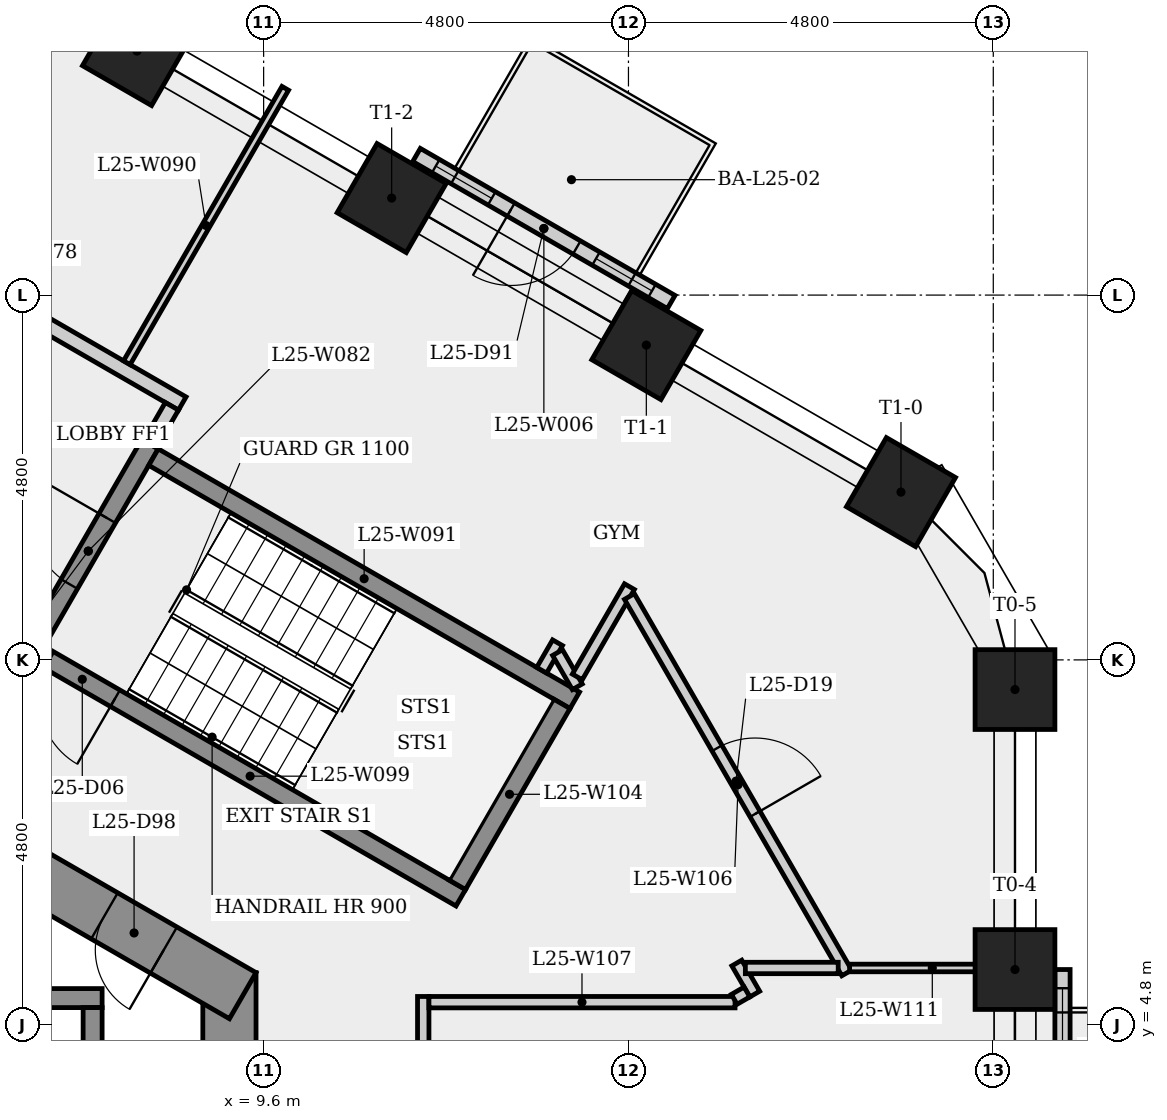
"""IFC4 building model, lengths in metres.
Left out: names, types, materials, properties, quantities, classifications, styles, units other than length and angle.
Written with IfcOpenShell. Run it as: python <this file> out.ifc"""

import sys

from ifc_helpers import new_model, si_unit, direction, frame, frame_2d, origin, origin_2d, place, context, subcontext, project, spatial, rectangle, extrude, element, fill, save


model = new_model("IFC4")
c1 = context("Model", 3, precision=1e-05, world=origin(), true_north=direction((0.0, 1.0)))
c2 = subcontext(c1, "Body", "Model", "MODEL_VIEW")
j1 = project(units=[si_unit("LENGTHUNIT", "METRE"), si_unit("PLANEANGLEUNIT", "RADIAN")], contexts=[c1])
p1 = place(None, origin())
s1 = spatial("IfcSite", under=j1, at=p1, CompositionType="ELEMENT")
p2 = place(p1, origin())
s2 = spatial("IfcBuilding", under=s1, at=p2, CompositionType="ELEMENT")
p3 = place(p2, frame((0.0, 0.0, 96.7)))
s3 = spatial("IfcBuildingStorey", under=s2, at=p3, CompositionType="ELEMENT", Elevation=96.7)
p4 = place(p3, frame((9.15, -5.485, 0.0), z_axis=(0.0, 0.0, 1.0), x_axis=(0.0, 1.0, 0.0)))
e1 = element("IfcWall", 1, at=p4, inside=s3, PredefinedType="SHEAR", context=c2, shape_type="SweptSolid", body=[
    extrude(rectangle(XDim=10.97, YDim=0.7, at=frame_2d((5.485, 0.0))), origin(), (0.0, 0.0, 1.0), 3.4),
])
p5 = place(p4, frame((4.685, 0.0, 0.0)))
e2 = element("IfcOpeningElement", 2, at=p5, cuts=e1, PredefinedType="OPENING", context=c2, shape_type="SweptSolid", body=[
    extrude(rectangle(XDim=1.6, YDim=2.1, at=frame_2d((0.8, 1.05))), frame((0.0, 0.36, 0.0), z_axis=(0.0, -1.0, 0.0), x_axis=(1.0, 0.0, 0.0)), (0.0, 0.0, 1.0), 0.72),
])
p6 = place(p3, frame((9.325, 5.182, 0.0), z_axis=(0.0, 0.0, 1.0), x_axis=(-0.866023993627, 0.500002442456, 0.0)))
e3 = element("IfcWall", 3, at=p6, inside=s3, PredefinedType="SHEAR", context=c2, shape_type="SweptSolid", body=[
    extrude(rectangle(XDim=10.97, YDim=0.7, at=frame_2d((5.485, 0.0))), origin(), (0.0, 0.0, 1.0), 3.4),
])
p7 = place(p6, frame((7.46, 0.0, 0.0)))
e4 = element("IfcOpeningElement", 4, at=p7, cuts=e3, PredefinedType="OPENING", context=c2, shape_type="SweptSolid", body=[
    extrude(rectangle(XDim=0.9, YDim=2.1, at=frame_2d((0.45, 1.05))), frame((0.0, 0.36, 0.0), z_axis=(0.0, -1.0, 0.0), x_axis=(1.0, 0.0, 0.0)), (0.0, 0.0, 1.0), 0.72),
])
p8 = place(p6, frame((1.201, 0.0, 0.0)))
e5 = element("IfcOpeningElement", 5, at=p8, cuts=e3, PredefinedType="OPENING", context=c2, shape_type="SweptSolid", body=[
    extrude(rectangle(XDim=0.9, YDim=2.1, at=frame_2d((0.45, 1.05))), frame((0.0, 0.36, 0.0), z_axis=(0.0, -1.0, 0.0), x_axis=(1.0, 0.0, 0.0)), (0.0, 0.0, 1.0), 0.72),
])
for number, where, z_axis, x_axis in (
    (6, (19.486, 5.526, 0.0), (0.0, 0.0, 1.0), (1.0, 0.0, 0.0)),
    (7, (19.486, 9.209, 0.0), (0.0, 0.0, 1.0), (1.0, 0.0, 0.0)),
    (8, (17.986, 11.808, 0.0), (0.0, 0.0, 1.0), (0.5, 0.866, 0.0)),
    (9, (14.635, 13.742, 0.0), (0.0, 0.0, 1.0), (0.5, 0.866, 0.0)),
    (10, (11.284, 15.677, 0.0), (0.0, 0.0, 1.0), (0.5, 0.866, 0.0)),
    (11, (7.934, 17.611, 0.0), (0.0, 0.0, 1.0), (0.5, 0.866, 0.0)),
):
    element("IfcColumn", number, at=place(p3, frame(where, z_axis=z_axis, x_axis=x_axis)), inside=s3, PredefinedType="COLUMN", context=c2, shape_type="SweptSolid", body=[
        extrude(rectangle(XDim=1.05, YDim=1.05, at=origin_2d()), origin(), (0.0, 0.0, 1.0), 3.4),
    ])
p9 = place(p3, frame((20.111, 1.842, 0.0), z_axis=(0.0, 0.0, 1.0), x_axis=(0.0, 1.0, 0.0)))
e12 = element("IfcWall", 12, at=p9, inside=s3, PredefinedType="SOLIDWALL", context=c2, shape_type="SweptSolid", body=[
    extrude(rectangle(XDim=3.684, YDim=0.2, at=frame_2d((1.842, 0.0))), origin(), (0.0, 0.0, 1.0), 3.4),
])
p10 = place(p9, frame((1.342, 0.0, 0.0)))
e13 = element("IfcOpeningElement", 13, at=p10, cuts=e12, PredefinedType="OPENING", context=c2, shape_type="SweptSolid", body=[
    extrude(rectangle(XDim=1.0, YDim=2.4, at=frame_2d((0.5, 1.2))), frame((0.0, 0.11, 0.0), z_axis=(0.0, -1.0, 0.0), x_axis=(1.0, 0.0, 0.0)), (0.0, 0.0, 1.0), 0.22),
])
p11 = place(p9, frame((0.246, 0.0, 0.9)))
e14 = element("IfcOpeningElement", 14, at=p11, cuts=e12, PredefinedType="OPENING", context=c2, shape_type="SweptSolid", body=[
    extrude(rectangle(XDim=0.85, YDim=1.5, at=frame_2d((0.425, 0.75))), frame((0.0, 0.11, 0.0), z_axis=(0.0, -1.0, 0.0), x_axis=(1.0, 0.0, 0.0)), (0.0, 0.0, 1.0), 0.22),
])
p12 = place(p9, frame((2.588, 0.0, 0.9)))
e15 = element("IfcOpeningElement", 15, at=p12, cuts=e12, PredefinedType="OPENING", context=c2, shape_type="SweptSolid", body=[
    extrude(rectangle(XDim=0.85, YDim=1.5, at=frame_2d((0.425, 0.75))), frame((0.0, 0.11, 0.0), z_axis=(0.0, -1.0, 0.0), x_axis=(1.0, 0.0, 0.0)), (0.0, 0.0, 1.0), 0.22),
])
p13 = place(p3, frame((14.962, 14.309, 0.0), z_axis=(0.0, 0.0, 1.0), x_axis=(-0.866013246922, 0.500021055713, 0.0)))
e16 = element("IfcWall", 16, at=p13, inside=s3, PredefinedType="SOLIDWALL", context=c2, shape_type="SweptSolid", body=[
    extrude(rectangle(XDim=3.869, YDim=0.2, at=frame_2d((1.935, 0.0))), origin(), (0.0, 0.0, 1.0), 3.4),
])
p14 = place(p13, frame((1.435, 0.0, 0.0)))
e17 = element("IfcOpeningElement", 17, at=p14, cuts=e16, PredefinedType="OPENING", context=c2, shape_type="SweptSolid", body=[
    extrude(rectangle(XDim=1.0, YDim=2.4, at=frame_2d((0.5, 1.2))), frame((0.0, 0.11, 0.0), z_axis=(0.0, -1.0, 0.0), x_axis=(1.0, 0.0, 0.0)), (0.0, 0.0, 1.0), 0.22),
])
p15 = place(p13, frame((0.292, 0.0, 0.9)))
e18 = element("IfcOpeningElement", 18, at=p15, cuts=e16, PredefinedType="OPENING", context=c2, shape_type="SweptSolid", body=[
    extrude(rectangle(XDim=0.85, YDim=1.5, at=frame_2d((0.425, 0.75))), frame((0.0, 0.11, 0.0), z_axis=(0.0, -1.0, 0.0), x_axis=(1.0, 0.0, 0.0)), (0.0, 0.0, 1.0), 0.22),
])
p16 = place(p13, frame((2.727, 0.0, 0.9)))
e19 = element("IfcOpeningElement", 19, at=p16, cuts=e16, PredefinedType="OPENING", context=c2, shape_type="SweptSolid", body=[
    extrude(rectangle(XDim=0.85, YDim=1.5, at=frame_2d((0.425, 0.75))), frame((0.0, 0.11, 0.0), z_axis=(0.0, -1.0, 0.0), x_axis=(1.0, 0.0, 0.0)), (0.0, 0.0, 1.0), 0.22),
])
p17 = place(p3, frame((-7.225, 5.15, 0.0), z_axis=(0.0, 0.0, 1.0), x_axis=(1.0, 0.0, 0.0)))
e20 = element("IfcWall", 20, at=p17, inside=s3, PredefinedType="SHEAR", context=c2, shape_type="SweptSolid", body=[
    extrude(rectangle(XDim=14.7, YDim=0.25, at=frame_2d((7.35, 0.0))), origin(), (0.0, 0.0, 1.0), 3.05),
])
p18 = place(p3, frame((4.459, 15.323, 0.0), z_axis=(0.0, 0.0, 1.0), x_axis=(0.866016039709, -0.500016218704, 0.0)))
e21 = element("IfcWall", 21, at=p18, inside=s3, PredefinedType="PARTITIONING", context=c2, shape_type="SweptSolid", body=[
    extrude(rectangle(XDim=4.7, YDim=0.2, at=frame_2d((2.35, 0.0))), origin(), (0.0, 0.0, 1.0), 3.05),
])
p19 = place(p3, frame((6.48, 9.624, 0.0), z_axis=(0.0, 0.0, 1.0), x_axis=(0.500017246033, 0.866015446554, 0.0)))
e22 = element("IfcWall", 22, at=p19, inside=s3, PredefinedType="SHEAR", context=c2, shape_type="SweptSolid", body=[
    extrude(rectangle(XDim=3.25, YDim=0.25, at=frame_2d((1.625, 0.0))), origin(), (0.0, 0.0, 1.0), 3.05),
])
p20 = place(p19, frame((1.125, 0.0, 0.0)))
e23 = element("IfcOpeningElement", 23, at=p20, cuts=e22, PredefinedType="OPENING", context=c2, shape_type="SweptSolid", body=[
    extrude(rectangle(XDim=1.0, YDim=2.1, at=frame_2d((0.5, 1.05))), frame((0.0, 0.135, 0.0), z_axis=(0.0, -1.0, 0.0), x_axis=(1.0, 0.0, 0.0)), (0.0, 0.0, 1.0), 0.27),
])
p21 = place(p3, frame((7.35, 5.025, 0.0), z_axis=(0.0, 0.0, 1.0), x_axis=(0.0, -1.0, 0.0)))
e24 = element("IfcWall", 24, at=p21, inside=s3, PredefinedType="SHEAR", context=c2, shape_type="SweptSolid", body=[
    extrude(rectangle(XDim=3.1, YDim=0.25, at=frame_2d((1.55, 0.0))), origin(), (0.0, 0.0, 1.0), 3.4),
])
p22 = place(p3, frame((7.8, 13.51, 0.0), z_axis=(0.0, 0.0, 1.0), x_axis=(0.499980976928, 0.866036386482, 0.0)))
e25 = element("IfcWall", 25, at=p22, inside=s3, PredefinedType="PARTITIONING", context=c2, shape_type="SweptSolid", body=[
    extrude(rectangle(XDim=4.169, YDim=0.1, at=frame_2d((2.084, 0.0))), origin(), (0.0, 0.0, 1.0), 3.05),
])
p23 = place(p3, frame((8.151, 12.268, 0.0), z_axis=(0.0, 0.0, 1.0), x_axis=(0.866025499775, -0.499999833739, 0.0)))
e26 = element("IfcWall", 26, at=p23, inside=s3, PredefinedType="SHEAR", context=c2, shape_type="SweptSolid", body=[
    extrude(rectangle(XDim=6.4, YDim=0.25, at=frame_2d((3.2, 0.0))), origin(), (0.0, 0.0, 1.0), 3.05),
])
p24 = place(p3, frame((8.393, 12.937, 0.0), z_axis=(0.0, 0.0, 1.0), x_axis=(-0.500065409566, -0.86598763626, 0.0)))
e27 = element("IfcWall", 27, at=p24, inside=s3, PredefinedType="PARTITIONING", context=c2, shape_type="SweptSolid", body=[
    extrude(rectangle(XDim=0.575, YDim=0.2, at=frame_2d((0.288, 0.0))), origin(), (0.0, 0.0, 1.0), 3.05),
])
p25 = place(p3, frame((11.7, -5.471, 0.0), z_axis=(0.0, 0.0, 1.0), x_axis=(0.0, 1.0, 0.0)))
e28 = element("IfcWall", 28, at=p25, inside=s3, PredefinedType="PARTITIONING", context=c2, shape_type="SweptSolid", body=[
    extrude(rectangle(XDim=10.643, YDim=0.15, at=frame_2d((5.321, 0.0))), origin(), (0.0, 0.0, 1.0), 3.05),
])
p26 = place(p25, frame((6.647, 0.0, 0.0)))
e29 = element("IfcOpeningElement", 29, at=p26, cuts=e28, PredefinedType="OPENING", context=c2, shape_type="SweptSolid", body=[
    extrude(rectangle(XDim=1.0, YDim=2.1, at=frame_2d((0.5, 1.05))), frame((0.0, 0.085, 0.0), z_axis=(0.0, -1.0, 0.0), x_axis=(1.0, 0.0, 0.0)), (0.0, 0.0, 1.0), 0.17),
])
p27 = place(p3, frame((12.194, 6.47, 0.0), z_axis=(0.0, 0.0, 1.0), x_axis=(-0.866025499775, 0.499999833739, 0.0)))
e30 = element("IfcWall", 30, at=p27, inside=s3, PredefinedType="SHEAR", context=c2, shape_type="SweptSolid", body=[
    extrude(rectangle(XDim=6.4, YDim=0.25, at=frame_2d((3.2, 0.0))), origin(), (0.0, 0.0, 1.0), 3.05),
])
p28 = place(p27, frame((5.25, 0.0, 0.0)))
e31 = element("IfcOpeningElement", 31, at=p28, cuts=e30, PredefinedType="OPENING", context=c2, shape_type="SweptSolid", body=[
    extrude(rectangle(XDim=1.0, YDim=2.1, at=frame_2d((0.5, 1.05))), frame((0.0, 0.135, 0.0), z_axis=(0.0, -1.0, 0.0), x_axis=(1.0, 0.0, 0.0)), (0.0, 0.0, 1.0), 0.27),
])
p29 = place(p3, frame((13.258, 9.464, 0.0), z_axis=(0.0, 0.0, 1.0), x_axis=(0.49990781971, 0.866078617559, 0.0)))
e32 = element("IfcWall", 32, at=p29, inside=s3, PredefinedType="PARTITIONING", context=c2, shape_type="SweptSolid", body=[
    extrude(rectangle(XDim=0.418, YDim=0.15, at=frame_2d((0.209, 0.0))), origin(), (0.0, 0.0, 1.0), 3.05),
])
p30 = place(p3, frame((13.467, 9.696, 0.0), z_axis=(0.0, 0.0, 1.0), x_axis=(0.499980071345, -0.866036909293, 0.0)))
e33 = element("IfcWall", 33, at=p30, inside=s3, PredefinedType="PARTITIONING", context=c2, shape_type="SweptSolid", body=[
    extrude(rectangle(XDim=0.52, YDim=0.15, at=frame_2d((0.26, 0.0))), origin(), (0.0, 0.0, 1.0), 3.05),
])
p31 = place(p3, frame((13.523, 9.022, 0.0), z_axis=(0.0, 0.0, 1.0), x_axis=(-0.500034990121, -0.866005201286, 0.0)))
e34 = element("IfcWall", 34, at=p31, inside=s3, PredefinedType="SHEAR", context=c2, shape_type="SweptSolid", body=[
    extrude(rectangle(XDim=2.75, YDim=0.25, at=frame_2d((1.375, 0.0))), origin(), (0.0, 0.0, 1.0), 3.05),
])
p32 = place(p3, frame((13.727, 9.376, 0.0), z_axis=(0.0, 0.0, 1.0), x_axis=(0.500025491523, 0.866010685746, 0.0)))
e35 = element("IfcWall", 35, at=p32, inside=s3, PredefinedType="PARTITIONING", context=c2, shape_type="SweptSolid", body=[
    extrude(rectangle(XDim=1.372, YDim=0.15, at=frame_2d((0.686, 0.0))), origin(), (0.0, 0.0, 1.0), 3.05),
])
p33 = place(p3, frame((14.413, 10.434, 0.0), z_axis=(0.0, 0.0, 1.0), x_axis=(0.49999591573, -0.866027761826, 0.0)))
e36 = element("IfcWall", 36, at=p33, inside=s3, PredefinedType="PARTITIONING", context=c2, shape_type="SweptSolid", body=[
    extrude(rectangle(XDim=5.719, YDim=0.15, at=frame_2d((2.859, 0.0))), origin(), (0.0, 0.0, 1.0), 3.05),
])
p34 = place(p33, frame((2.304, 0.0, 0.0)))
e37 = element("IfcOpeningElement", 37, at=p34, cuts=e36, PredefinedType="OPENING", context=c2, shape_type="SweptSolid", body=[
    extrude(rectangle(XDim=1.0, YDim=2.1, at=frame_2d((0.5, 1.05))), frame((0.0, 0.085, 0.0), z_axis=(0.0, -1.0, 0.0), x_axis=(1.0, 0.0, 0.0)), (0.0, 0.0, 1.0), 0.17),
])
p35 = place(p3, frame((15.802, 5.096, 0.0), z_axis=(0.0, 0.0, 1.0), x_axis=(-1.0, 0.0, 0.0)))
e38 = element("IfcWall", 38, at=p35, inside=s3, PredefinedType="PARTITIONING", context=c2, shape_type="SweptSolid", body=[
    extrude(rectangle(XDim=4.027, YDim=0.15, at=frame_2d((2.014, 0.0))), origin(), (0.0, 0.0, 1.0), 3.05),
])
p36 = place(p3, frame((15.826, 5.611, 0.0), z_axis=(0.0, 0.0, 1.0), x_axis=(0.499647745683, -0.866228682412, 0.0)))
e39 = element("IfcWall", 39, at=p36, inside=s3, PredefinedType="PARTITIONING", context=c2, shape_type="SweptSolid", body=[
    extrude(rectangle(XDim=0.471, YDim=0.15, at=frame_2d((0.236, 0.0))), origin(), (0.0, 0.0, 1.0), 3.05),
])
p37 = place(p3, frame((15.959, 5.23, 0.0), z_axis=(0.0, 0.0, 1.0), x_axis=(-0.865974735705, -0.50008774942, 0.0)))
e40 = element("IfcWall", 40, at=p37, inside=s3, PredefinedType="PARTITIONING", context=c2, shape_type="SweptSolid", body=[
    extrude(rectangle(XDim=0.193, YDim=0.15, at=frame_2d((0.096, 0.0))), origin(), (0.0, 0.0, 1.0), 3.05),
])
p38 = place(p3, frame((17.31, 5.546, 0.0), z_axis=(0.0, 0.0, 1.0), x_axis=(1.0, 0.0, 0.0)))
e41 = element("IfcWall", 41, at=p38, inside=s3, PredefinedType="PARTITIONING", context=c2, shape_type="SweptSolid", body=[
    extrude(rectangle(XDim=2.176, YDim=0.1, at=frame_2d((1.088, 0.0))), origin(), (0.0, 0.0, 1.0), 3.05),
])
p39 = place(p3, frame((17.16, 5.546, 0.0), z_axis=(0.0, 0.0, 1.0), x_axis=(-1.0, 0.0, 0.0)))
e42 = element("IfcWall", 42, at=p39, inside=s3, PredefinedType="PARTITIONING", context=c2, shape_type="SweptSolid", body=[
    extrude(rectangle(XDim=1.222, YDim=0.15, at=frame_2d((0.611, 0.0))), origin(), (0.0, 0.0, 1.0), 3.05),
])
p40 = place(p12, origin())
e43 = element("IfcWindow", 43, at=p40, inside=s3, PartitioningType="SINGLE_PANEL", PredefinedType="WINDOW", context=c2, shape_type="SweptSolid", body=[
    extrude(rectangle(XDim=0.85, YDim=1.5, at=frame_2d((0.425, 0.75))), frame((0.0, 0.03, 0.0), z_axis=(0.0, -1.0, 0.0), x_axis=(1.0, 0.0, 0.0)), (0.0, 0.0, 1.0), 0.06),
])
fill(e15, e43)
p41 = place(p14, origin())
e44 = element("IfcDoor", 44, at=p41, inside=s3, OperationType="SINGLE_SWING_RIGHT", PredefinedType="DOOR", context=c2, shape_type="SweptSolid", body=[
    extrude(rectangle(XDim=1.0, YDim=2.4, at=frame_2d((0.5, 1.2))), frame((0.0, 0.025, 0.0), z_axis=(0.0, -1.0, 0.0), x_axis=(1.0, 0.0, 0.0)), (0.0, 0.0, 1.0), 0.05),
])
fill(e17, e44)
p42 = place(p15, origin())
e45 = element("IfcWindow", 45, at=p42, inside=s3, PartitioningType="SINGLE_PANEL", PredefinedType="WINDOW", context=c2, shape_type="SweptSolid", body=[
    extrude(rectangle(XDim=0.85, YDim=1.5, at=frame_2d((0.425, 0.75))), frame((0.0, 0.03, 0.0), z_axis=(0.0, -1.0, 0.0), x_axis=(1.0, 0.0, 0.0)), (0.0, 0.0, 1.0), 0.06),
])
fill(e18, e45)
p43 = place(p16, origin())
e46 = element("IfcWindow", 46, at=p43, inside=s3, PartitioningType="SINGLE_PANEL", PredefinedType="WINDOW", context=c2, shape_type="SweptSolid", body=[
    extrude(rectangle(XDim=0.85, YDim=1.5, at=frame_2d((0.425, 0.75))), frame((0.0, 0.03, 0.0), z_axis=(0.0, -1.0, 0.0), x_axis=(1.0, 0.0, 0.0)), (0.0, 0.0, 1.0), 0.06),
])
fill(e19, e46)
p44 = place(p28, origin())
e47 = element("IfcDoor", 47, at=p44, inside=s3, OperationType="SINGLE_SWING_LEFT", PredefinedType="DOOR", context=c2, shape_type="SweptSolid", body=[
    extrude(rectangle(XDim=1.0, YDim=2.1, at=frame_2d((0.5, 1.05))), frame((0.0, 0.025, 0.0), z_axis=(0.0, -1.0, 0.0), x_axis=(1.0, 0.0, 0.0)), (0.0, 0.0, 1.0), 0.05),
])
fill(e31, e47)
p45 = place(p20, origin())
e48 = element("IfcDoor", 48, at=p45, inside=s3, OperationType="SINGLE_SWING_RIGHT", PredefinedType="DOOR", context=c2, shape_type="SweptSolid", body=[
    extrude(rectangle(XDim=1.0, YDim=2.1, at=frame_2d((0.5, 1.05))), frame((0.0, 0.025, 0.0), z_axis=(0.0, -1.0, 0.0), x_axis=(1.0, 0.0, 0.0)), (0.0, 0.0, 1.0), 0.05),
])
fill(e23, e48)
p46 = place(p34, origin())
e49 = element("IfcDoor", 49, at=p46, inside=s3, OperationType="SINGLE_SWING_RIGHT", PredefinedType="DOOR", context=c2, shape_type="SweptSolid", body=[
    extrude(rectangle(XDim=1.0, YDim=2.1, at=frame_2d((0.5, 1.05))), frame((0.0, 0.025, 0.0), z_axis=(0.0, -1.0, 0.0), x_axis=(1.0, 0.0, 0.0)), (0.0, 0.0, 1.0), 0.05),
])
fill(e37, e49)
p47 = place(p8, origin())
e50 = element("IfcDoor", 50, at=p47, inside=s3, OperationType="SINGLE_SWING_LEFT", PredefinedType="DOOR", context=c2, shape_type="SweptSolid", body=[
    extrude(rectangle(XDim=0.9, YDim=2.1, at=frame_2d((0.45, 1.05))), frame((0.0, 0.025, 0.0), z_axis=(0.0, -1.0, 0.0), x_axis=(1.0, 0.0, 0.0)), (0.0, 0.0, 1.0), 0.05),
])
fill(e5, e50)
save(model, sys.argv[1])
